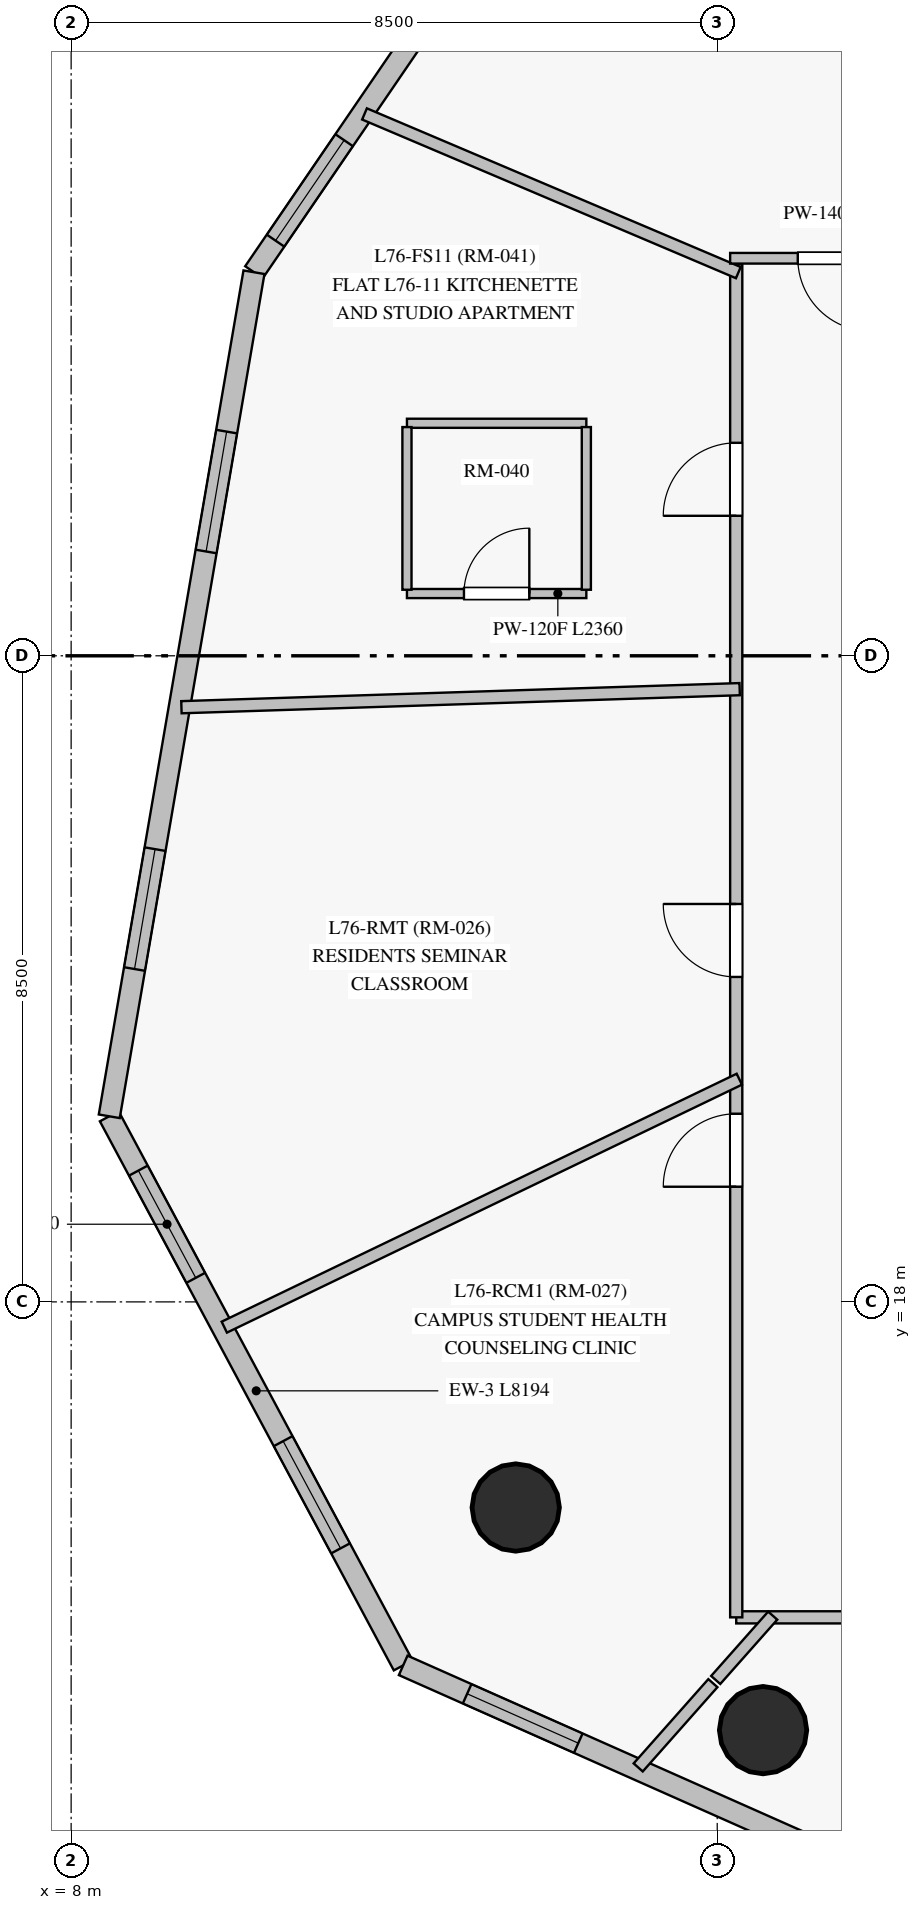
"""IFC4 building model, lengths in metres.
Left out: names, types, materials, properties, quantities, classifications, styles, units other than length and angle.
Written with IfcOpenShell. Run it as: python <this file> out.ifc"""

import sys

from ifc_helpers import new_model, si_unit, direction, frame, frame_2d, origin, origin_with_axes, origin_2d, place, context, subcontext, project, spatial, rectangle, circle, extrude, source, transform, mapped, element, fill, save


model = new_model("IFC4")
c1 = context("Model", 3, precision=1e-05, world=origin(), true_north=direction((0.0, 1.0)))
c2 = subcontext(c1, "Body", "Model", "MODEL_VIEW")
j1 = project(units=[si_unit("LENGTHUNIT", "METRE"), si_unit("PLANEANGLEUNIT", "RADIAN")], contexts=[c1])
p1 = place(None, origin())
s1 = spatial("IfcSite", under=j1, at=p1, CompositionType="ELEMENT")
p2 = place(p1, origin())
s2 = spatial("IfcBuilding", under=s1, at=p2, CompositionType="ELEMENT")
p3 = place(p2, frame((0.0, 0.0, 256.55)))
s3 = spatial("IfcBuildingStorey", under=s2, at=p3, CompositionType="ELEMENT", Elevation=256.55)
m1 = source(origin_with_axes(), c2, "Body", "SweptSolid", [
    extrude(circle(Radius=0.575, at=origin_2d()), origin(), (0.0, 0.0, 1.0), 3.05),
])
for number, where, z_axis, x_axis in (
    (1, (13.849, 15.295, 0.0), (0.0, 0.0, 1.0), (1.0, 0.0, 0.0)),
    (2, (17.103, 12.366, 0.0), (0.0, 0.0, 1.0), (1.0, 0.0, 0.0)),
):
    element("IfcColumn", number, at=place(p3, frame(where, z_axis=z_axis, x_axis=x_axis)), inside=s3, PredefinedType="COLUMN", context=c2, shape_type="MappedRepresentation", body=[
        mapped(m1, transform((0.0, 0.0, 0.0), scale=1.0)),
    ])
p4 = place(p3, frame((8.502, 20.442, 0.0), z_axis=(0.0, 0.0, 1.0), x_axis=(0.47191462029, -0.881644254309, 0.0)))
e3 = element("IfcWall", 3, at=p4, inside=s3, PredefinedType="SOLIDWALL", context=c2, shape_type="SweptSolid", body=[
    extrude(rectangle(XDim=8.194, YDim=0.28, at=frame_2d((4.097, 0.0))), origin(), (0.0, 0.0, 1.0), 2.85),
])
p5 = place(p4, frame((0.811, 0.0, 0.85)))
e4 = element("IfcOpeningElement", 4, at=p5, cuts=e3, PredefinedType="OPENING", context=c2, shape_type="SweptSolid", body=[
    extrude(rectangle(XDim=1.6, YDim=1.6, at=frame_2d((0.8, 0.8))), frame((0.0, 0.15, 0.0), z_axis=(0.0, -1.0, 0.0), x_axis=(1.0, 0.0, 0.0)), (0.0, 0.0, 1.0), 0.3),
])
p6 = place(p4, frame((4.847, 0.0, 0.85)))
e5 = element("IfcOpeningElement", 5, at=p6, cuts=e3, PredefinedType="OPENING", context=c2, shape_type="SweptSolid", body=[
    extrude(rectangle(XDim=1.6, YDim=1.6, at=frame_2d((0.8, 0.8))), frame((0.0, 0.15, 0.0), z_axis=(0.0, -1.0, 0.0), x_axis=(1.0, 0.0, 0.0)), (0.0, 0.0, 1.0), 0.3),
])
p7 = place(p3, frame((12.368, 13.218, 0.0), z_axis=(0.0, 0.0, 1.0), x_axis=(0.913891953807, -0.405957506109, 0.0)))
e6 = element("IfcWall", 6, at=p7, inside=s3, PredefinedType="SOLIDWALL", context=c2, shape_type="SweptSolid", body=[
    extrude(rectangle(XDim=11.267, YDim=0.28, at=frame_2d((5.633, 0.0))), origin(), (0.0, 0.0, 1.0), 2.85),
])
p8 = place(p7, frame((0.921, 0.0, 0.85)))
e7 = element("IfcOpeningElement", 7, at=p8, cuts=e6, PredefinedType="OPENING", context=c2, shape_type="SweptSolid", body=[
    extrude(rectangle(XDim=1.6, YDim=1.6, at=frame_2d((0.8, 0.8))), frame((0.0, 0.15, 0.0), z_axis=(0.0, -1.0, 0.0), x_axis=(1.0, 0.0, 0.0)), (0.0, 0.0, 1.0), 0.3),
])
p9 = place(p7, frame((6.082, 0.0, 0.85)))
e8 = element("IfcOpeningElement", 8, at=p9, cuts=e6, PredefinedType="OPENING", context=c2, shape_type="SweptSolid", body=[
    extrude(rectangle(XDim=1.6, YDim=1.6, at=frame_2d((0.8, 0.8))), frame((0.0, 0.15, 0.0), z_axis=(0.0, -1.0, 0.0), x_axis=(1.0, 0.0, 0.0)), (0.0, 0.0, 1.0), 0.3),
])
p10 = place(p3, frame((15.419, 38.887, 0.0), z_axis=(0.0, 0.0, 1.0), x_axis=(-0.564013262642, -0.825765729226, 0.0)))
e9 = element("IfcWall", 9, at=p10, inside=s3, PredefinedType="SOLIDWALL", context=c2, shape_type="SweptSolid", body=[
    extrude(rectangle(XDim=8.89, YDim=0.28, at=frame_2d((4.445, 0.0))), origin(), (0.0, 0.0, 1.0), 2.85),
])
p11 = place(p10, frame((2.402, 0.0, 0.85)))
e10 = element("IfcOpeningElement", 10, at=p11, cuts=e9, PredefinedType="OPENING", context=c2, shape_type="SweptSolid", body=[
    extrude(rectangle(XDim=1.6, YDim=1.6, at=frame_2d((0.8, 0.8))), frame((0.0, 0.15, 0.0), z_axis=(0.0, -1.0, 0.0), x_axis=(1.0, 0.0, 0.0)), (0.0, 0.0, 1.0), 0.3),
])
p12 = place(p10, frame((6.786, 0.0, 0.85)))
e11 = element("IfcOpeningElement", 11, at=p12, cuts=e9, PredefinedType="OPENING", context=c2, shape_type="SweptSolid", body=[
    extrude(rectangle(XDim=1.6, YDim=1.6, at=frame_2d((0.8, 0.8))), frame((0.0, 0.15, 0.0), z_axis=(0.0, -1.0, 0.0), x_axis=(1.0, 0.0, 0.0)), (0.0, 0.0, 1.0), 0.3),
])
p13 = place(p3, frame((10.406, 31.546, 0.0), z_axis=(0.0, 0.0, 1.0), x_axis=(-0.168983062071, -0.985618955141, 0.0)))
e12 = element("IfcWall", 12, at=p13, inside=s3, PredefinedType="SOLIDWALL", context=c2, shape_type="SweptSolid", body=[
    extrude(rectangle(XDim=11.266, YDim=0.28, at=frame_2d((5.633, 0.0))), origin(), (0.0, 0.0, 1.0), 2.85),
])
p14 = place(p13, frame((2.127, 0.0, 0.85)))
e13 = element("IfcOpeningElement", 13, at=p14, cuts=e12, PredefinedType="OPENING", context=c2, shape_type="SweptSolid", body=[
    extrude(rectangle(XDim=1.6, YDim=1.6, at=frame_2d((0.8, 0.8))), frame((0.0, 0.15, 0.0), z_axis=(0.0, -1.0, 0.0), x_axis=(1.0, 0.0, 0.0)), (0.0, 0.0, 1.0), 0.3),
])
p15 = place(p13, frame((7.701, 0.0, 0.85)))
e14 = element("IfcOpeningElement", 14, at=p15, cuts=e12, PredefinedType="OPENING", context=c2, shape_type="SweptSolid", body=[
    extrude(rectangle(XDim=1.6, YDim=1.6, at=frame_2d((0.8, 0.8))), frame((0.0, 0.15, 0.0), z_axis=(0.0, -1.0, 0.0), x_axis=(1.0, 0.0, 0.0)), (0.0, 0.0, 1.0), 0.3),
])
p16 = place(p3, frame((41.8, 13.85, 0.0), z_axis=(0.0, 0.0, 1.0), x_axis=(-1.0, 0.0, 0.0)))
e15 = element("IfcWall", 15, at=p16, inside=s3, PredefinedType="PARTITIONING", context=c2, shape_type="SweptSolid", body=[
    extrude(rectangle(XDim=25.05, YDim=0.16, at=frame_2d((12.525, 0.0))), origin(), (0.0, 0.0, 1.0), 2.3),
])
p17 = place(p16, frame((14.763, 0.0, 0.0)))
e16 = element("IfcOpeningElement", 16, at=p17, cuts=e15, PredefinedType="OPENING", context=c2, shape_type="SweptSolid", body=[
    extrude(rectangle(XDim=0.96, YDim=2.15, at=frame_2d((0.48, 1.075))), frame((0.0, 0.09, 0.0), z_axis=(0.0, -1.0, 0.0), x_axis=(1.0, 0.0, 0.0)), (0.0, 0.0, 1.0), 0.18),
])
p18 = place(p16, frame((18.452, 0.0, 0.0)))
e17 = element("IfcOpeningElement", 17, at=p18, cuts=e15, PredefinedType="OPENING", context=c2, shape_type="SweptSolid", body=[
    extrude(rectangle(XDim=0.96, YDim=2.15, at=frame_2d((0.48, 1.075))), frame((0.0, 0.09, 0.0), z_axis=(0.0, -1.0, 0.0), x_axis=(1.0, 0.0, 0.0)), (0.0, 0.0, 1.0), 0.18),
])
p19 = place(p16, frame((8.292, 0.0, 0.0)))
e18 = element("IfcOpeningElement", 18, at=p19, cuts=e15, PredefinedType="OPENING", context=c2, shape_type="SweptSolid", body=[
    extrude(rectangle(XDim=0.96, YDim=2.15, at=frame_2d((0.48, 1.075))), frame((0.0, 0.09, 0.0), z_axis=(0.0, -1.0, 0.0), x_axis=(1.0, 0.0, 0.0)), (0.0, 0.0, 1.0), 0.18),
])
p20 = place(p16, frame((5.147, 0.0, 0.0)))
e19 = element("IfcOpeningElement", 19, at=p20, cuts=e15, PredefinedType="OPENING", context=c2, shape_type="SweptSolid", body=[
    extrude(rectangle(XDim=0.96, YDim=2.15, at=frame_2d((0.48, 1.075))), frame((0.0, 0.09, 0.0), z_axis=(0.0, -1.0, 0.0), x_axis=(1.0, 0.0, 0.0)), (0.0, 0.0, 1.0), 0.18),
])
p21 = place(p3, frame((16.75, 13.85, 0.0), z_axis=(0.0, 0.0, 1.0), x_axis=(0.0, 1.0, 0.0)))
e20 = element("IfcWall", 20, at=p21, inside=s3, PredefinedType="PARTITIONING", context=c2, shape_type="SweptSolid", body=[
    extrude(rectangle(XDim=17.8, YDim=0.16, at=frame_2d((8.9, 0.0))), origin(), (0.0, 0.0, 1.0), 2.45),
])
p22 = place(p21, frame((14.492, 0.0, 0.0)))
e21 = element("IfcOpeningElement", 21, at=p22, cuts=e20, PredefinedType="OPENING", context=c2, shape_type="SweptSolid", body=[
    extrude(rectangle(XDim=0.96, YDim=2.15, at=frame_2d((0.48, 1.075))), frame((0.0, 0.09, 0.0), z_axis=(0.0, -1.0, 0.0), x_axis=(1.0, 0.0, 0.0)), (0.0, 0.0, 1.0), 0.18),
])
p23 = place(p21, frame((8.425, 0.0, 0.0)))
e22 = element("IfcOpeningElement", 22, at=p23, cuts=e20, PredefinedType="OPENING", context=c2, shape_type="SweptSolid", body=[
    extrude(rectangle(XDim=0.96, YDim=2.15, at=frame_2d((0.48, 1.075))), frame((0.0, 0.09, 0.0), z_axis=(0.0, -1.0, 0.0), x_axis=(1.0, 0.0, 0.0)), (0.0, 0.0, 1.0), 0.18),
])
p24 = place(p21, frame((5.665, 0.0, 0.0)))
e23 = element("IfcOpeningElement", 23, at=p24, cuts=e20, PredefinedType="OPENING", context=c2, shape_type="SweptSolid", body=[
    extrude(rectangle(XDim=0.96, YDim=2.15, at=frame_2d((0.48, 1.075))), frame((0.0, 0.09, 0.0), z_axis=(0.0, -1.0, 0.0), x_axis=(1.0, 0.0, 0.0)), (0.0, 0.0, 1.0), 0.18),
])
p25 = place(p3, frame((16.791, 20.93, 0.0), z_axis=(0.0, 0.0, 1.0), x_axis=(-0.901021408569, -0.433774620397, 0.0)))
e24 = element("IfcWall", 24, at=p25, inside=s3, PredefinedType="PARTITIONING", context=c2, shape_type="SweptSolid", body=[
    extrude(rectangle(XDim=7.52, YDim=0.16, at=frame_2d((3.76, 0.0))), origin(), (0.0, 0.0, 1.0), 2.85),
])
p26 = place(p3, frame((9.451, 25.823, 0.0), z_axis=(0.0, 0.0, 1.0), x_axis=(0.999477313038, 0.032328017605, 0.0)))
e25 = element("IfcWall", 25, at=p26, inside=s3, PredefinedType="PARTITIONING", context=c2, shape_type="SweptSolid", body=[
    extrude(rectangle(XDim=7.348, YDim=0.16, at=frame_2d((3.674, 0.0))), origin(), (0.0, 0.0, 1.0), 2.85),
])
p27 = place(p3, frame((16.778, 31.541, 0.0), z_axis=(0.0, 0.0, 1.0), x_axis=(-0.920498619333, 0.390745814829, 0.0)))
e26 = element("IfcWall", 26, at=p27, inside=s3, PredefinedType="PARTITIONING", context=c2, shape_type="SweptSolid", body=[
    extrude(rectangle(XDim=5.343, YDim=0.16, at=frame_2d((2.671, 0.0))), origin(), (0.0, 0.0, 1.0), 2.85),
])
p28 = place(p3, frame((19.42, 31.73, 0.0), z_axis=(0.0, 0.0, 1.0), x_axis=(-1.0, 0.0, 0.0)))
e27 = element("IfcWall", 27, at=p28, inside=s3, PredefinedType="PARTITIONING", context=c2, shape_type="SweptSolid", body=[
    extrude(rectangle(XDim=2.75, YDim=0.14, at=frame_2d((1.375, 0.0))), origin(), (0.0, 0.0, 1.0), 2.85),
])
p29 = place(p28, frame((0.9, 0.0, 0.0)))
e28 = element("IfcOpeningElement", 28, at=p29, cuts=e27, PredefinedType="OPENING", context=c2, shape_type="SweptSolid", body=[
    extrude(rectangle(XDim=0.96, YDim=2.15, at=frame_2d((0.48, 1.075))), frame((0.0, 0.08, 0.0), z_axis=(0.0, -1.0, 0.0), x_axis=(1.0, 0.0, 0.0)), (0.0, 0.0, 1.0), 0.16),
])
p30 = place(p3, frame((12.418, 27.319, 0.0), z_axis=(0.0, 0.0, 1.0), x_axis=(1.0, 0.0, 0.0)))
e29 = element("IfcWall", 29, at=p30, inside=s3, PredefinedType="PARTITIONING", context=c2, shape_type="SweptSolid", body=[
    extrude(rectangle(XDim=2.36, YDim=0.12, at=frame_2d((1.18, 0.0))), origin(), (0.0, 0.0, 1.0), 2.85),
])
p31 = place(p30, frame((0.75, 0.0, 0.0)))
e30 = element("IfcOpeningElement", 30, at=p31, cuts=e29, PredefinedType="OPENING", context=c2, shape_type="SweptSolid", body=[
    extrude(rectangle(XDim=0.86, YDim=2.1, at=frame_2d((0.43, 1.05))), frame((0.0, 0.07, 0.0), z_axis=(0.0, -1.0, 0.0), x_axis=(1.0, 0.0, 0.0)), (0.0, 0.0, 1.0), 0.14),
])
p32 = place(p3, frame((14.778, 29.559, 0.0), z_axis=(0.0, 0.0, 1.0), x_axis=(-1.0, 0.0, 0.0)))
e31 = element("IfcWall", 31, at=p32, inside=s3, PredefinedType="PARTITIONING", context=c2, shape_type="SweptSolid", body=[
    extrude(rectangle(XDim=2.36, YDim=0.12, at=frame_2d((1.18, 0.0))), origin(), (0.0, 0.0, 1.0), 2.85),
])
p33 = place(p3, frame((14.778, 27.369, 0.0), z_axis=(0.0, 0.0, 1.0), x_axis=(0.0, 1.0, 0.0)))
e32 = element("IfcWall", 32, at=p33, inside=s3, PredefinedType="PARTITIONING", context=c2, shape_type="SweptSolid", body=[
    extrude(rectangle(XDim=2.14, YDim=0.12, at=frame_2d((1.07, 0.0))), origin(), (0.0, 0.0, 1.0), 2.3),
])
p34 = place(p3, frame((12.418, 29.509, 0.0), z_axis=(0.0, 0.0, 1.0), x_axis=(0.0, -1.0, 0.0)))
e33 = element("IfcWall", 33, at=p34, inside=s3, PredefinedType="PARTITIONING", context=c2, shape_type="SweptSolid", body=[
    extrude(rectangle(XDim=2.14, YDim=0.12, at=frame_2d((1.07, 0.0))), origin(), (0.0, 0.0, 1.0), 2.85),
])
p35 = place(p3, frame((16.443, 12.984, 0.0), z_axis=(0.0, 0.0, 1.0), x_axis=(-0.663320096345, -0.748335786786, 0.0)))
e34 = element("IfcWall", 34, at=p35, inside=s3, PredefinedType="PARTITIONING", context=c2, shape_type="SweptSolid", body=[
    extrude(rectangle(XDim=1.482, YDim=0.16, at=frame_2d((0.741, 0.0))), origin(), (0.0, 0.0, 1.0), 2.85),
])
p36 = place(p3, frame((17.23, 13.873, 0.0), z_axis=(0.0, 0.0, 1.0), x_axis=(-0.663076715011, -0.748551447805, 0.0)))
e35 = element("IfcWall", 35, at=p36, inside=s3, PredefinedType="PARTITIONING", context=c2, shape_type="SweptSolid", body=[
    extrude(rectangle(XDim=1.131, YDim=0.16, at=frame_2d((0.565, 0.0))), origin(), (0.0, 0.0, 1.0), 2.35),
])
m2 = source(origin_with_axes(), c2, "Body", "SweptSolid", [
    extrude(rectangle(XDim=1.6, YDim=1.6, at=frame_2d((0.8, 0.8))), frame((0.0, 0.03, 0.0), z_axis=(0.0, -1.0, 0.0), x_axis=(1.0, 0.0, 0.0)), (0.0, 0.0, 1.0), 0.06),
])
p37 = place(p5, origin())
e36 = element("IfcWindow", 36, at=p37, inside=s3, PartitioningType="SINGLE_PANEL", PredefinedType="WINDOW", context=c2, shape_type="MappedRepresentation", body=[
    mapped(m2, transform((0.0, 0.0, 0.0), scale=1.0)),
])
fill(e4, e36)
p38 = place(p6, origin())
e37 = element("IfcWindow", 37, at=p38, inside=s3, PartitioningType="SINGLE_PANEL", PredefinedType="WINDOW", context=c2, shape_type="MappedRepresentation", body=[
    mapped(m2, transform((0.0, 0.0, 0.0), scale=1.0)),
])
fill(e5, e37)
p39 = place(p8, origin())
e38 = element("IfcWindow", 38, at=p39, inside=s3, PartitioningType="SINGLE_PANEL", PredefinedType="WINDOW", context=c2, shape_type="MappedRepresentation", body=[
    mapped(m2, transform((0.0, 0.0, 0.0), scale=1.0)),
])
fill(e7, e38)
p40 = place(p12, origin())
e39 = element("IfcWindow", 39, at=p40, inside=s3, PartitioningType="SINGLE_PANEL", PredefinedType="WINDOW", context=c2, shape_type="MappedRepresentation", body=[
    mapped(m2, transform((0.0, 0.0, 0.0), scale=1.0)),
])
fill(e11, e39)
p41 = place(p14, origin())
e40 = element("IfcWindow", 40, at=p41, inside=s3, PartitioningType="SINGLE_PANEL", PredefinedType="WINDOW", context=c2, shape_type="MappedRepresentation", body=[
    mapped(m2, transform((0.0, 0.0, 0.0), scale=1.0)),
])
fill(e13, e40)
p42 = place(p15, origin())
e41 = element("IfcWindow", 41, at=p42, inside=s3, PartitioningType="SINGLE_PANEL", PredefinedType="WINDOW", context=c2, shape_type="MappedRepresentation", body=[
    mapped(m2, transform((0.0, 0.0, 0.0), scale=1.0)),
])
fill(e14, e41)
m3 = source(origin_with_axes(), c2, "Body", "SweptSolid", [
    extrude(rectangle(XDim=0.96, YDim=2.15, at=frame_2d((0.48, 1.075))), frame((0.0, 0.025, 0.0), z_axis=(0.0, -1.0, 0.0), x_axis=(1.0, 0.0, 0.0)), (0.0, 0.0, 1.0), 0.05),
])
p43 = place(p29, origin())
e42 = element("IfcDoor", 42, at=p43, inside=s3, OperationType="SINGLE_SWING_LEFT", PredefinedType="DOOR", context=c2, shape_type="MappedRepresentation", body=[
    mapped(m3, transform((0.0, 0.0, 0.0), scale=1.0)),
])
fill(e28, e42)
m4 = source(origin_with_axes(), c2, "Body", "SweptSolid", [
    extrude(rectangle(XDim=0.86, YDim=2.1, at=frame_2d((0.43, 1.05))), frame((0.0, 0.025, 0.0), z_axis=(0.0, -1.0, 0.0), x_axis=(1.0, 0.0, 0.0)), (0.0, 0.0, 1.0), 0.05),
])
p44 = place(p31, origin())
e43 = element("IfcDoor", 43, at=p44, inside=s3, OperationType="SINGLE_SWING_RIGHT", PredefinedType="DOOR", context=c2, shape_type="MappedRepresentation", body=[
    mapped(m4, transform((0.0, 0.0, 0.0), scale=1.0)),
])
fill(e30, e43)
p45 = place(p22, origin())
e44 = element("IfcDoor", 44, at=p45, inside=s3, OperationType="SINGLE_SWING_LEFT", PredefinedType="DOOR", context=c2, shape_type="MappedRepresentation", body=[
    mapped(m3, transform((0.0, 0.0, 0.0), scale=1.0)),
])
fill(e21, e44)
p46 = place(p23, origin())
e45 = element("IfcDoor", 45, at=p46, inside=s3, OperationType="SINGLE_SWING_RIGHT", PredefinedType="DOOR", context=c2, shape_type="MappedRepresentation", body=[
    mapped(m3, transform((0.0, 0.0, 0.0), scale=1.0)),
])
fill(e22, e45)
p47 = place(p24, origin())
e46 = element("IfcDoor", 46, at=p47, inside=s3, OperationType="SINGLE_SWING_LEFT", PredefinedType="DOOR", context=c2, shape_type="MappedRepresentation", body=[
    mapped(m3, transform((0.0, 0.0, 0.0), scale=1.0)),
])
fill(e23, e46)
save(model, sys.argv[1])
